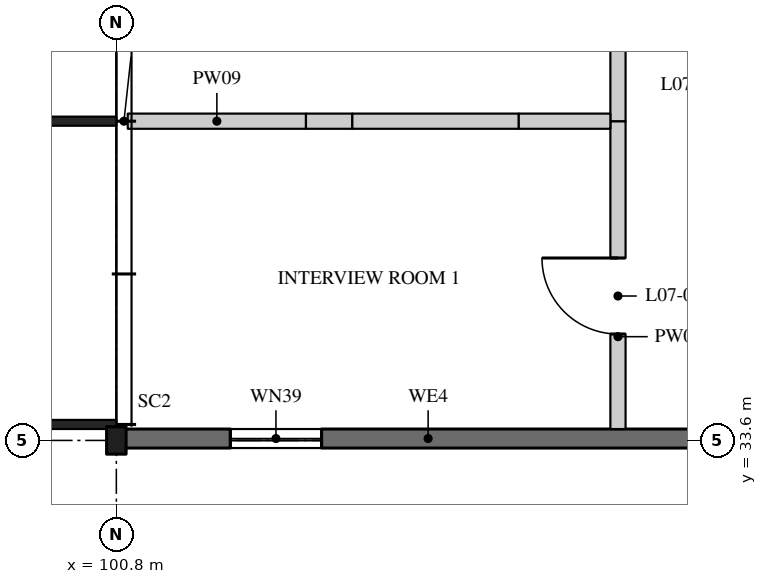
"""IFC4 building model, lengths in metres.
Left out: names, types, materials, properties, quantities, classifications, styles, units other than length and angle.
Written with IfcOpenShell. Run it as: python <this file> out.ifc"""

import sys

from ifc_helpers import new_model, si_unit, direction, frame, frame_2d, origin, origin_2d, place, context, subcontext, project, spatial, rectangle, i_section, extrude, element, fill, save


model = new_model("IFC4")
c1 = context("Model", 3, precision=1e-05, world=origin(), true_north=direction((0.0, 1.0)))
c2 = subcontext(c1, "Body", "Model", "MODEL_VIEW")
j1 = project(units=[si_unit("LENGTHUNIT", "METRE"), si_unit("PLANEANGLEUNIT", "RADIAN")], contexts=[c1])
p1 = place(None, origin())
s1 = spatial("IfcSite", under=j1, at=p1, CompositionType="ELEMENT")
p2 = place(p1, origin())
s2 = spatial("IfcBuilding", under=s1, at=p2, CompositionType="ELEMENT")
p3 = place(p2, frame((0.0, 0.0, 32.4)))
s3 = spatial("IfcBuildingStorey", under=s2, at=p3, CompositionType="ELEMENT", Elevation=32.4)
p4 = place(p3, frame((100.8, 33.6, 0.0), z_axis=(0.0, 0.0, 1.0), x_axis=(1.0, 0.0, 0.0)))
e1 = element("IfcColumn", 1, at=p4, inside=s3, PredefinedType="COLUMN", context=c2, shape_type="SweptSolid", body=[
    extrude(i_section(OverallWidth=0.257, OverallDepth=0.361, WebThickness=0.011, FlangeThickness=0.02, FilletRadius=0.015, at=origin_2d()), origin(), (0.0, 0.0, 1.0), 4.37),
])
p5 = place(p3, frame((107.4, 33.75, 0.0), z_axis=(0.0, 0.0, 1.0), x_axis=(0.0, 1.0, 0.0)))
e2 = element("IfcWall", 2, at=p5, inside=s3, PredefinedType="PARTITIONING", context=c2, shape_type="SweptSolid", body=[
    extrude(rectangle(XDim=4.05, YDim=0.2, at=frame_2d((2.025, 0.0))), origin(), (0.0, 0.0, 1.0), 4.37),
])
p6 = place(p5, frame((1.25, 0.0, 0.0)))
e3 = element("IfcOpeningElement", 3, at=p6, cuts=e2, PredefinedType="OPENING", context=c2, shape_type="SweptSolid", body=[
    extrude(rectangle(XDim=1.0, YDim=2.1, at=frame_2d((0.5, 1.05))), frame((0.0, 0.11, 0.0), z_axis=(0.0, -1.0, 0.0), x_axis=(1.0, 0.0, 0.0)), (0.0, 0.0, 1.0), 0.22),
])
p7 = place(p3, frame((107.4, 37.8, 0.0), z_axis=(0.0, 0.0, 1.0), x_axis=(0.0, 1.0, 0.0)))
e4 = element("IfcWall", 4, at=p7, inside=s3, PredefinedType="PARTITIONING", context=c2, shape_type="SweptSolid", body=[
    extrude(rectangle(XDim=3.59, YDim=0.2, at=frame_2d((1.795, 0.0))), origin(), (0.0, 0.0, 1.0), 4.37),
])
p8 = place(p7, frame((1.3, 0.0, 0.0)))
e5 = element("IfcOpeningElement", 5, at=p8, cuts=e4, PredefinedType="OPENING", context=c2, shape_type="SweptSolid", body=[
    extrude(rectangle(XDim=1.0, YDim=2.1, at=frame_2d((0.5, 1.05))), frame((0.0, 0.11, 0.0), z_axis=(0.0, -1.0, 0.0), x_axis=(1.0, 0.0, 0.0)), (0.0, 0.0, 1.0), 0.22),
])
p9 = place(p3, frame((100.95, 37.8, 0.0), z_axis=(0.0, 0.0, 1.0), x_axis=(1.0, 0.0, 0.0)))
e6 = element("IfcWall", 6, at=p9, inside=s3, PredefinedType="PARTITIONING", context=c2, shape_type="SweptSolid", body=[
    extrude(rectangle(XDim=2.345, YDim=0.2, at=frame_2d((1.172, 0.0))), origin(), (0.0, 0.0, 1.0), 4.37),
])
p10 = place(p3, frame((103.295, 37.8, 0.0), z_axis=(0.0, 0.0, 1.0), x_axis=(1.0, 0.0, 0.0)))
e7 = element("IfcWall", 7, at=p10, inside=s3, PredefinedType="PARTITIONING", context=c2, shape_type="SweptSolid", body=[
    extrude(rectangle(XDim=0.61, YDim=0.2, at=frame_2d((0.305, 0.0))), origin(), (0.0, 0.0, 1.0), 3.895),
])
p11 = place(p3, frame((103.905, 37.8, 0.0), z_axis=(0.0, 0.0, 1.0), x_axis=(1.0, 0.0, 0.0)))
e8 = element("IfcWall", 8, at=p11, inside=s3, PredefinedType="PARTITIONING", context=c2, shape_type="SweptSolid", body=[
    extrude(rectangle(XDim=2.19, YDim=0.2, at=frame_2d((1.095, 0.0))), origin(), (0.0, 0.0, 1.0), 4.37),
])
p12 = place(p3, frame((106.095, 37.8, 0.0), z_axis=(0.0, 0.0, 1.0), x_axis=(1.0, 0.0, 0.0)))
e9 = element("IfcWall", 9, at=p12, inside=s3, PredefinedType="PARTITIONING", context=c2, shape_type="SweptSolid", body=[
    extrude(rectangle(XDim=1.205, YDim=0.2, at=frame_2d((0.603, 0.0))), origin(), (0.0, 0.0, 1.0), 3.895),
])
p13 = place(p3, frame((100.804, 33.625, 0.0), z_axis=(0.0, 0.0, 1.0), x_axis=(1.0, 0.0, 0.0)))
e10 = element("IfcWall", 10, at=p13, inside=s3, PredefinedType="SOLIDWALL", context=c2, shape_type="SweptSolid", body=[
    extrude(rectangle(XDim=8.196, YDim=0.25, at=frame_2d((4.098, 0.0))), origin(), (0.0, 0.0, 1.0), 3.746),
])
p14 = place(p13, frame((1.496, 0.0, 2.1)))
e11 = element("IfcOpeningElement", 11, at=p14, cuts=e10, PredefinedType="OPENING", context=c2, shape_type="SweptSolid", body=[
    extrude(rectangle(XDim=1.2, YDim=0.45, at=frame_2d((0.6, 0.225))), frame((0.0, 0.135, 0.0), z_axis=(0.0, -1.0, 0.0), x_axis=(1.0, 0.0, 0.0)), (0.0, 0.0, 1.0), 0.27),
])
p15 = place(p6, origin())
e12 = element("IfcDoor", 12, at=p15, inside=s3, OperationType="SINGLE_SWING_LEFT", PredefinedType="DOOR", context=c2, shape_type="SweptSolid", body=[
    extrude(rectangle(XDim=1.0, YDim=2.1, at=frame_2d((0.5, 1.05))), frame((0.0, 0.045, 0.0), z_axis=(0.0, -1.0, 0.0), x_axis=(1.0, 0.0, 0.0)), (0.0, 0.0, 1.0), 0.09),
])
fill(e3, e12)
p16 = place(p14, origin())
e13 = element("IfcWindow", 13, at=p16, inside=s3, PartitioningType="SINGLE_PANEL", PredefinedType="WINDOW", context=c2, shape_type="SweptSolid", body=[
    extrude(rectangle(XDim=1.2, YDim=0.45, at=frame_2d((0.6, 0.225))), frame((0.0, 0.05, 0.0), z_axis=(0.0, -1.0, 0.0), x_axis=(1.0, 0.0, 0.0)), (0.0, 0.0, 1.0), 0.1),
])
fill(e11, e13)
save(model, sys.argv[1])
